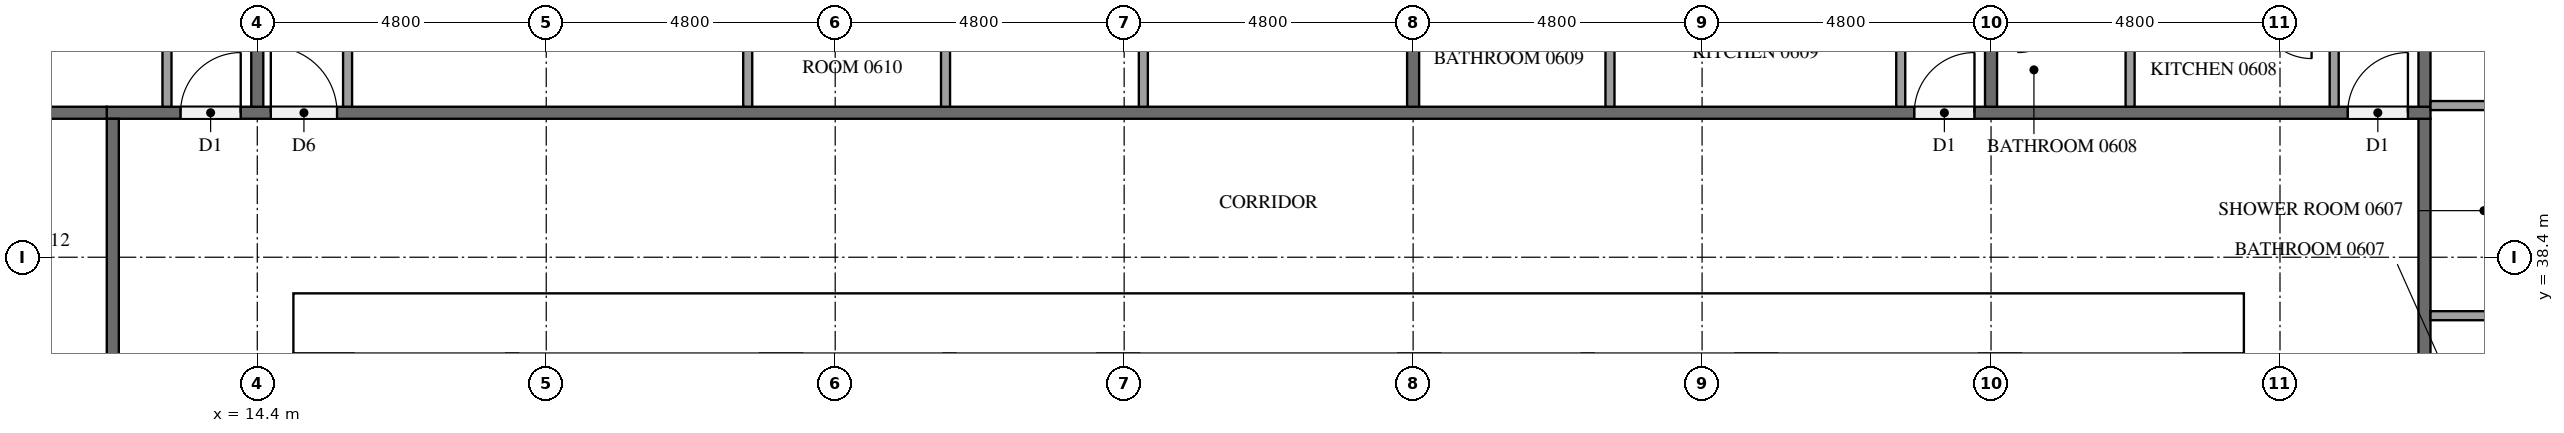
"""IFC4 building model, lengths in metres.
Left out: names, types, materials, properties, quantities, classifications, styles, units other than length and angle.
Written with IfcOpenShell. Run it as: python <this file> out.ifc"""

import sys

from ifc_helpers import new_model, si_unit, direction, frame, frame_2d, origin, place, context, subcontext, project, spatial, rectangle, extrude, element, fill, save


model = new_model("IFC4")
c1 = context("Model", 3, precision=1e-05, world=origin(), true_north=direction((0.0, 1.0)))
c2 = subcontext(c1, "Body", "Model", "MODEL_VIEW")
j1 = project(units=[si_unit("LENGTHUNIT", "METRE"), si_unit("PLANEANGLEUNIT", "RADIAN")], contexts=[c1])
p1 = place(None, origin())
s1 = spatial("IfcSite", under=j1, at=p1, CompositionType="ELEMENT")
p2 = place(p1, origin())
s2 = spatial("IfcBuilding", under=s1, at=p2, CompositionType="ELEMENT")
p3 = place(p2, frame((0.0, 0.0, 29.4)))
s3 = spatial("IfcBuildingStorey", under=s2, at=p3, CompositionType="ELEMENT", Elevation=29.4)
p4 = place(p3, frame((15.0, 37.3, 0.0), z_axis=(0.0, 0.0, 1.0), x_axis=(1.0, 0.0, 0.0)))
e1 = element("IfcWall", 1, at=p4, inside=s3, PredefinedType="SHEAR", context=c2, shape_type="SweptSolid", body=[
    extrude(rectangle(XDim=32.4, YDim=1.0, at=frame_2d((16.2, 0.0))), origin(), (0.0, 0.0, 1.0), 3.2),
])
p5 = place(p4, frame((15.3, 0.0, 0.0)))
e2 = element("IfcOpeningElement", 2, at=p5, cuts=e1, PredefinedType="OPENING", context=c2, shape_type="SweptSolid", body=[
    extrude(rectangle(XDim=1.8, YDim=2.1, at=frame_2d((0.9, 1.05))), frame((0.0, 0.51, 0.0), z_axis=(0.0, -1.0, 0.0), x_axis=(1.0, 0.0, 0.0)), (0.0, 0.0, 1.0), 1.02),
])
p6 = place(p4, frame((1.766, 0.0, 0.0)))
e3 = element("IfcOpeningElement", 3, at=p6, cuts=e1, PredefinedType="OPENING", context=c2, shape_type="SweptSolid", body=[
    extrude(rectangle(XDim=1.0, YDim=2.1, at=frame_2d((0.5, 1.05))), frame((0.0, 0.51, 0.0), z_axis=(0.0, -1.0, 0.0), x_axis=(1.0, 0.0, 0.0)), (0.0, 0.0, 1.0), 1.02),
])
p7 = place(p4, frame((5.241, 0.0, 0.0)))
e4 = element("IfcOpeningElement", 4, at=p7, cuts=e1, PredefinedType="OPENING", context=c2, shape_type="SweptSolid", body=[
    extrude(rectangle(XDim=1.0, YDim=2.1, at=frame_2d((0.5, 1.05))), frame((0.0, 0.51, 0.0), z_axis=(0.0, -1.0, 0.0), x_axis=(1.0, 0.0, 0.0)), (0.0, 0.0, 1.0), 1.02),
])
for number, where, z_axis, x_axis in (
    (5, (28.7, 33.9, 0.0), (0.0, 0.0, 1.0), (0.0, 1.0, 0.0)),
    (6, (33.7, 33.9, 0.0), (0.0, 0.0, 1.0), (0.0, 1.0, 0.0)),
):
    element("IfcWall", number, at=place(p3, frame(where, z_axis=z_axis, x_axis=x_axis)), inside=s3, PredefinedType="SHEAR", context=c2, shape_type="SweptSolid", body=[
        extrude(rectangle(XDim=2.9, YDim=0.7, at=frame_2d((1.45, 0.0))), origin(), (0.0, 0.0, 1.0), 3.2),
    ])
for number, where, z_axis, x_axis in (
    (7, (25.9, 33.9, 0.0), (0.0, 0.0, 1.0), (0.0, 1.0, 0.0)),
    (8, (36.5, 33.9, 0.0), (0.0, 0.0, 1.0), (0.0, 1.0, 0.0)),
):
    element("IfcWall", number, at=place(p3, frame(where, z_axis=z_axis, x_axis=x_axis)), inside=s3, PredefinedType="SOLIDWALL", context=c2, shape_type="SweptSolid", body=[
        extrude(rectangle(XDim=2.9, YDim=0.2, at=frame_2d((1.45, 0.0))), origin(), (0.0, 0.0, 1.0), 3.2),
    ])
p8 = place(p3, frame((18.633, 31.6, 0.0), z_axis=(0.0, 0.0, 1.0), x_axis=(0.0, 1.0, 0.0)))
e9 = element("IfcWall", 9, at=p8, inside=s3, PredefinedType="PARTITIONING", context=c2, shape_type="SweptSolid", body=[
    extrude(rectangle(XDim=5.2, YDim=0.2, at=frame_2d((2.6, 0.0))), origin(), (0.0, 0.0, 1.0), 3.2),
])
p9 = place(p3, frame((50.4, 40.7, 0.0), z_axis=(0.0, 0.0, 1.0), x_axis=(0.0, -1.0, 0.0)))
e10 = element("IfcWall", 10, at=p9, inside=s3, PredefinedType="PARTITIONING", context=c2, shape_type="SweptSolid", body=[
    extrude(rectangle(XDim=28.6, YDim=0.2, at=frame_2d((14.3, 0.0))), origin(), (0.0, 0.0, 1.0), 3.2),
])
p10 = place(p9, frame((27.375, 0.0, 0.0)))
e11 = element("IfcOpeningElement", 11, at=p10, cuts=e10, PredefinedType="OPENING", context=c2, shape_type="SweptSolid", body=[
    extrude(rectangle(XDim=1.1, YDim=2.1, at=frame_2d((0.55, 1.05))), frame((0.0, 0.11, 0.0), z_axis=(0.0, -1.0, 0.0), x_axis=(1.0, 0.0, 0.0)), (0.0, 0.0, 1.0), 0.22),
])
p11 = place(p9, frame((8.225, 0.0, 0.0)))
e12 = element("IfcOpeningElement", 12, at=p11, cuts=e10, PredefinedType="OPENING", context=c2, shape_type="SweptSolid", body=[
    extrude(rectangle(XDim=1.0, YDim=2.1, at=frame_2d((0.5, 1.05))), frame((0.0, 0.11, 0.0), z_axis=(0.0, -1.0, 0.0), x_axis=(1.0, 0.0, 0.0)), (0.0, 0.0, 1.0), 0.22),
])
p12 = place(p3, frame((11.9, 40.8, 0.0), z_axis=(0.0, 0.0, 1.0), x_axis=(1.0, 0.0, 0.0)))
e13 = element("IfcWall", 13, at=p12, inside=s3, PredefinedType="PARTITIONING", context=c2, shape_type="SweptSolid", body=[
    extrude(rectangle(XDim=38.6, YDim=0.2, at=frame_2d((19.3, 0.0))), origin(), (0.0, 0.0, 1.0), 3.2),
])
p13 = place(p12, frame((37.225, 0.0, 0.0)))
e14 = element("IfcOpeningElement", 14, at=p13, cuts=e13, PredefinedType="OPENING", context=c2, shape_type="SweptSolid", body=[
    extrude(rectangle(XDim=1.0, YDim=2.1, at=frame_2d((0.5, 1.05))), frame((0.0, 0.11, 0.0), z_axis=(0.0, -1.0, 0.0), x_axis=(1.0, 0.0, 0.0)), (0.0, 0.0, 1.0), 0.22),
])
p14 = place(p12, frame((30.025, 0.0, 0.0)))
e15 = element("IfcOpeningElement", 15, at=p14, cuts=e13, PredefinedType="OPENING", context=c2, shape_type="SweptSolid", body=[
    extrude(rectangle(XDim=1.0, YDim=2.1, at=frame_2d((0.5, 1.05))), frame((0.0, 0.11, 0.0), z_axis=(0.0, -1.0, 0.0), x_axis=(1.0, 0.0, 0.0)), (0.0, 0.0, 1.0), 0.22),
])
p15 = place(p12, frame((2.725, 0.0, 0.0)))
e16 = element("IfcOpeningElement", 16, at=p15, cuts=e13, PredefinedType="OPENING", context=c2, shape_type="SweptSolid", body=[
    extrude(rectangle(XDim=1.1, YDim=2.1, at=frame_2d((0.55, 1.05))), frame((0.0, 0.11, 0.0), z_axis=(0.0, -1.0, 0.0), x_axis=(1.0, 0.0, 0.0)), (0.0, 0.0, 1.0), 0.22),
])
p16 = place(p12, frame((1.225, 0.0, 0.0)))
e17 = element("IfcOpeningElement", 17, at=p16, cuts=e13, PredefinedType="OPENING", context=c2, shape_type="SweptSolid", body=[
    extrude(rectangle(XDim=1.0, YDim=2.1, at=frame_2d((0.5, 1.05))), frame((0.0, 0.11, 0.0), z_axis=(0.0, -1.0, 0.0), x_axis=(1.0, 0.0, 0.0)), (0.0, 0.0, 1.0), 0.22),
])
p17 = place(p3, frame((12.0, 12.1, 0.0), z_axis=(0.0, 0.0, 1.0), x_axis=(0.0, 1.0, 0.0)))
e18 = element("IfcWall", 18, at=p17, inside=s3, PredefinedType="PARTITIONING", context=c2, shape_type="SweptSolid", body=[
    extrude(rectangle(XDim=28.6, YDim=0.2, at=frame_2d((14.3, 0.0))), origin(), (0.0, 0.0, 1.0), 3.2),
])
p18 = place(p17, frame((16.975, 0.0, 0.0)))
e19 = element("IfcOpeningElement", 19, at=p18, cuts=e18, PredefinedType="OPENING", context=c2, shape_type="SweptSolid", body=[
    extrude(rectangle(XDim=1.0, YDim=2.1, at=frame_2d((0.5, 1.05))), frame((0.0, 0.11, 0.0), z_axis=(0.0, -1.0, 0.0), x_axis=(1.0, 0.0, 0.0)), (0.0, 0.0, 1.0), 0.22),
])
p19 = place(p17, frame((0.175, 0.0, 0.0)))
e20 = element("IfcOpeningElement", 20, at=p19, cuts=e18, PredefinedType="OPENING", context=c2, shape_type="SweptSolid", body=[
    extrude(rectangle(XDim=1.0, YDim=2.1, at=frame_2d((0.5, 1.05))), frame((0.0, 0.11, 0.0), z_axis=(0.0, -1.0, 0.0), x_axis=(1.0, 0.0, 0.0)), (0.0, 0.0, 1.0), 0.22),
])
p20 = place(p3, frame((50.4, 40.9, 0.0), z_axis=(0.0, 0.0, 1.0), x_axis=(0.0, 1.0, 0.0)))
e21 = element("IfcWall", 21, at=p20, inside=s3, PredefinedType="PARTITIONING", context=c2, shape_type="SweptSolid", body=[
    extrude(rectangle(XDim=7.0, YDim=0.2, at=frame_2d((3.5, 0.0))), origin(), (0.0, 0.0, 1.0), 3.2),
])
for number, where, z_axis, x_axis in (
    (22, (43.2, 47.55, 0.0), (0.0, 0.0, 1.0), (0.0, -1.0, 0.0)),
    (23, (33.6, 47.55, 0.0), (0.0, 0.0, 1.0), (0.0, -1.0, 0.0)),
    (24, (14.4, 47.55, 0.0), (0.0, 0.0, 1.0), (0.0, -1.0, 0.0)),
):
    element("IfcWall", number, at=place(p3, frame(where, z_axis=z_axis, x_axis=x_axis)), inside=s3, PredefinedType="PARTITIONING", context=c2, shape_type="SweptSolid", body=[
        extrude(rectangle(XDim=6.65, YDim=0.2, at=frame_2d((3.325, 0.0))), origin(), (0.0, 0.0, 1.0), 3.2),
    ])
p21 = place(p3, frame((0.1, 40.8, 0.0), z_axis=(0.0, 0.0, 1.0), x_axis=(1.0, 0.0, 0.0)))
e25 = element("IfcWall", 25, at=p21, inside=s3, PredefinedType="PARTITIONING", context=c2, shape_type="SweptSolid", body=[
    extrude(rectangle(XDim=11.8, YDim=0.2, at=frame_2d((5.9, 0.0))), origin(), (0.0, 0.0, 1.0), 3.2),
])
for number, where, z_axis, x_axis in (
    (26, (50.5, 37.429, 0.0), (0.0, 0.0, 1.0), (1.0, 0.0, 0.0)),
    (27, (50.5, 40.919, 0.0), (0.0, 0.0, 1.0), (1.0, 0.0, 0.0)),
):
    element("IfcWall", number, at=place(p3, frame(where, z_axis=z_axis, x_axis=x_axis)), inside=s3, PredefinedType="PARTITIONING", context=c2, shape_type="SweptSolid", body=[
        extrude(rectangle(XDim=1.775, YDim=0.15, at=frame_2d((0.887, 0.0))), origin(), (0.0, 0.0, 1.0), 3.2),
    ])
p22 = place(p3, frame((45.51, 40.9, 0.0), z_axis=(0.0, 0.0, 1.0), x_axis=(0.0, 1.0, 0.0)))
e28 = element("IfcWall", 28, at=p22, inside=s3, PredefinedType="PARTITIONING", context=c2, shape_type="SweptSolid", body=[
    extrude(rectangle(XDim=1.625, YDim=0.15, at=frame_2d((0.812, 0.0))), origin(), (0.0, 0.0, 1.0), 3.2),
])
for number, where, z_axis, x_axis in (
    (29, (48.9, 40.9, 0.0), (0.0, 0.0, 1.0), (0.0, 1.0, 0.0)),
    (30, (36.87, 40.9, 0.0), (0.0, 0.0, 1.0), (0.0, 1.0, 0.0)),
):
    element("IfcWall", number, at=place(p3, frame(where, z_axis=z_axis, x_axis=x_axis)), inside=s3, PredefinedType="PARTITIONING", context=c2, shape_type="SweptSolid", body=[
        extrude(rectangle(XDim=1.775, YDim=0.15, at=frame_2d((0.888, 0.0))), origin(), (0.0, 0.0, 1.0), 3.2),
    ])
p23 = place(p3, frame((41.7, 40.9, 0.0), z_axis=(0.0, 0.0, 1.0), x_axis=(0.0, 1.0, 0.0)))
e31 = element("IfcWall", 31, at=p23, inside=s3, PredefinedType="PARTITIONING", context=c2, shape_type="SweptSolid", body=[
    extrude(rectangle(XDim=1.925, YDim=0.15, at=frame_2d((0.962, 0.0))), origin(), (0.0, 0.0, 1.0), 3.2),
])
for number, where, z_axis, x_axis in (
    (32, (22.547, 40.9, 0.0), (0.0, 0.0, 1.0), (0.0, 1.0, 0.0)),
    (33, (25.833, 40.9, 0.0), (0.0, 0.0, 1.0), (0.0, 1.0, 0.0)),
    (34, (29.119, 40.9, 0.0), (0.0, 0.0, 1.0), (0.0, 1.0, 0.0)),
):
    element("IfcWall", number, at=place(p3, frame(where, z_axis=z_axis, x_axis=x_axis)), inside=s3, PredefinedType="PARTITIONING", context=c2, shape_type="SweptSolid", body=[
        extrude(rectangle(XDim=2.075, YDim=0.15, at=frame_2d((1.038, 0.0))), origin(), (0.0, 0.0, 1.0), 3.2),
    ])
p24 = place(p3, frame((15.9, 40.9, 0.0), z_axis=(0.0, 0.0, 1.0), x_axis=(0.0, 1.0, 0.0)))
e35 = element("IfcWall", 35, at=p24, inside=s3, PredefinedType="PARTITIONING", context=c2, shape_type="SweptSolid", body=[
    extrude(rectangle(XDim=2.225, YDim=0.15, at=frame_2d((1.113, 0.0))), origin(), (0.0, 0.0, 1.0), 3.2),
])
p25 = place(p3, frame((12.9, 40.9, 0.0), z_axis=(0.0, 0.0, 1.0), x_axis=(0.0, 1.0, 0.0)))
e36 = element("IfcWall", 36, at=p25, inside=s3, PredefinedType="PARTITIONING", context=c2, shape_type="SweptSolid", body=[
    extrude(rectangle(XDim=2.075, YDim=0.15, at=frame_2d((1.038, 0.0))), origin(), (0.0, 0.0, 1.0), 3.2),
])
p26 = place(p5, origin())
e37 = element("IfcDoor", 37, at=p26, inside=s3, OperationType="DOUBLE_DOOR_SINGLE_SWING", PredefinedType="DOOR", context=c2, shape_type="SweptSolid", body=[
    extrude(rectangle(XDim=1.8, YDim=2.1, at=frame_2d((0.9, 1.05))), frame((0.0, 0.025, 0.0), z_axis=(0.0, -1.0, 0.0), x_axis=(1.0, 0.0, 0.0)), (0.0, 0.0, 1.0), 0.05),
])
fill(e2, e37)
p27 = place(p6, origin())
e38 = element("IfcDoor", 38, at=p27, inside=s3, OperationType="SINGLE_SWING_LEFT", PredefinedType="DOOR", context=c2, shape_type="SweptSolid", body=[
    extrude(rectangle(XDim=1.0, YDim=2.1, at=frame_2d((0.5, 1.05))), frame((0.0, 0.025, 0.0), z_axis=(0.0, -1.0, 0.0), x_axis=(1.0, 0.0, 0.0)), (0.0, 0.0, 1.0), 0.05),
])
fill(e3, e38)
p28 = place(p7, origin())
e39 = element("IfcDoor", 39, at=p28, inside=s3, OperationType="SINGLE_SWING_RIGHT", PredefinedType="DOOR", context=c2, shape_type="SweptSolid", body=[
    extrude(rectangle(XDim=1.0, YDim=2.1, at=frame_2d((0.5, 1.05))), frame((0.0, 0.025, 0.0), z_axis=(0.0, -1.0, 0.0), x_axis=(1.0, 0.0, 0.0)), (0.0, 0.0, 1.0), 0.05),
])
fill(e4, e39)
p29 = place(p13, origin())
e40 = element("IfcDoor", 40, at=p29, inside=s3, OperationType="SINGLE_SWING_RIGHT", PredefinedType="DOOR", context=c2, shape_type="SweptSolid", body=[
    extrude(rectangle(XDim=1.0, YDim=2.1, at=frame_2d((0.5, 1.05))), frame((0.0, 0.025, 0.0), z_axis=(0.0, -1.0, 0.0), x_axis=(1.0, 0.0, 0.0)), (0.0, 0.0, 1.0), 0.05),
])
fill(e14, e40)
p30 = place(p14, origin())
e41 = element("IfcDoor", 41, at=p30, inside=s3, OperationType="SINGLE_SWING_RIGHT", PredefinedType="DOOR", context=c2, shape_type="SweptSolid", body=[
    extrude(rectangle(XDim=1.0, YDim=2.1, at=frame_2d((0.5, 1.05))), frame((0.0, 0.025, 0.0), z_axis=(0.0, -1.0, 0.0), x_axis=(1.0, 0.0, 0.0)), (0.0, 0.0, 1.0), 0.05),
])
fill(e15, e41)
p31 = place(p15, origin())
e42 = element("IfcDoor", 42, at=p31, inside=s3, OperationType="SINGLE_SWING_LEFT", PredefinedType="DOOR", context=c2, shape_type="SweptSolid", body=[
    extrude(rectangle(XDim=1.1, YDim=2.1, at=frame_2d((0.55, 1.05))), frame((0.0, 0.025, 0.0), z_axis=(0.0, -1.0, 0.0), x_axis=(1.0, 0.0, 0.0)), (0.0, 0.0, 1.0), 0.05),
])
fill(e16, e42)
p32 = place(p16, origin())
e43 = element("IfcDoor", 43, at=p32, inside=s3, OperationType="SINGLE_SWING_RIGHT", PredefinedType="DOOR", context=c2, shape_type="SweptSolid", body=[
    extrude(rectangle(XDim=1.0, YDim=2.1, at=frame_2d((0.5, 1.05))), frame((0.0, 0.025, 0.0), z_axis=(0.0, -1.0, 0.0), x_axis=(1.0, 0.0, 0.0)), (0.0, 0.0, 1.0), 0.05),
])
fill(e17, e43)
save(model, sys.argv[1])
